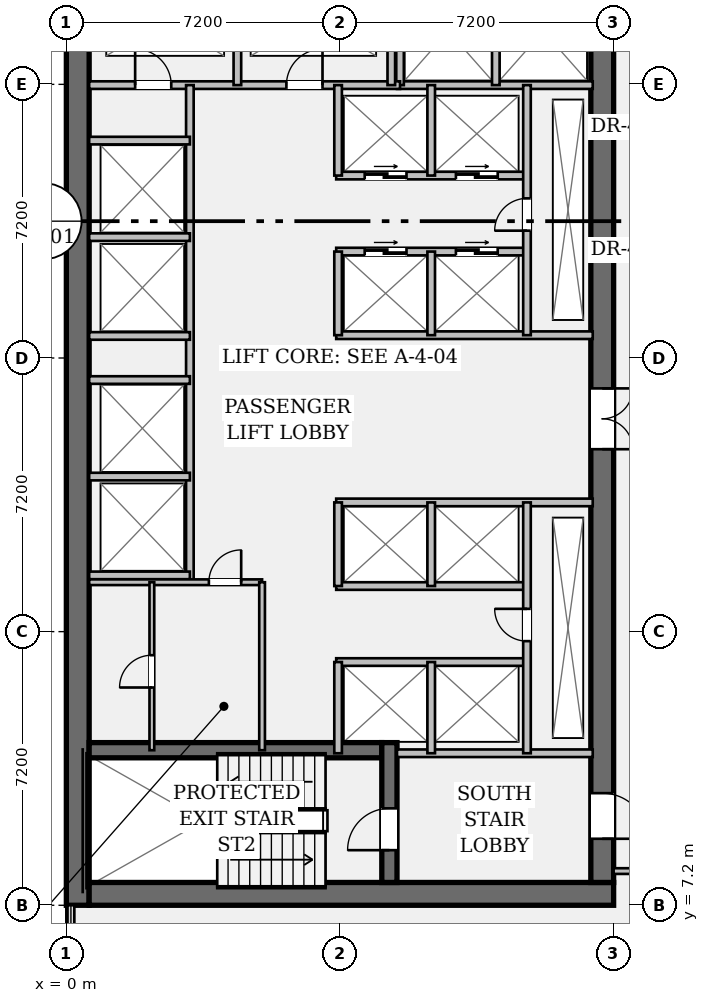
"""IFC4 building model, lengths in metres.
Left out: names, types, materials, properties, quantities, classifications, styles, units other than length and angle.
Written with IfcOpenShell. Run it as: python <this file> out.ifc"""

import sys

from ifc_helpers import new_model, si_unit, direction, frame, frame_2d, origin, place, context, subcontext, project, spatial, rectangle, extrude, element, fill, save


model = new_model("IFC4")
c1 = context("Model", 3, precision=1e-05, world=origin(), true_north=direction((0.0, 1.0)))
c2 = subcontext(c1, "Body", "Model", "MODEL_VIEW")
j1 = project(units=[si_unit("LENGTHUNIT", "METRE"), si_unit("PLANEANGLEUNIT", "RADIAN")], contexts=[c1])
p1 = place(None, origin())
s1 = spatial("IfcSite", under=j1, at=p1, CompositionType="ELEMENT")
p2 = place(p1, origin())
s2 = spatial("IfcBuilding", under=s1, at=p2, CompositionType="ELEMENT")
p3 = place(p2, frame((0.0, 0.0, 38.85)))
s3 = spatial("IfcBuildingStorey", under=s2, at=p3, CompositionType="ELEMENT", Elevation=38.85)
p4 = place(p3, frame((0.3, 7.2, 0.0), z_axis=(0.0, 0.0, 1.0), x_axis=(0.0, 1.0, 0.0)))
e1 = element("IfcWall", 1, at=p4, inside=s3, PredefinedType="SHEAR", context=c2, shape_type="SweptSolid", body=[
    extrude(rectangle(XDim=28.8, YDim=0.6, at=frame_2d((14.4, 0.0))), origin(), (0.0, 0.0, 1.0), 3.57),
])
p5 = place(p3, frame((0.6, 7.5, 0.0), z_axis=(0.0, 0.0, 1.0), x_axis=(1.0, 0.0, 0.0)))
e2 = element("IfcWall", 2, at=p5, inside=s3, PredefinedType="SHEAR", context=c2, shape_type="SweptSolid", body=[
    extrude(rectangle(XDim=13.8, YDim=0.6, at=frame_2d((6.9, 0.0))), origin(), (0.0, 0.0, 1.0), 3.57),
])
p6 = place(p3, frame((14.1, 35.4, 0.0), z_axis=(0.0, 0.0, 1.0), x_axis=(0.0, -1.0, 0.0)))
e3 = element("IfcWall", 3, at=p6, inside=s3, PredefinedType="SHEAR", context=c2, shape_type="SweptSolid", body=[
    extrude(rectangle(XDim=27.6, YDim=0.6, at=frame_2d((13.8, 0.0))), origin(), (0.0, 0.0, 1.0), 3.57),
])
p7 = place(p6, frame((1.3, 0.0, 0.0)))
e4 = element("IfcOpeningElement", 4, at=p7, cuts=e3, PredefinedType="OPENING", context=c2, shape_type="SweptSolid", body=[
    extrude(rectangle(XDim=1.2, YDim=2.15, at=frame_2d((0.6, 1.075))), frame((0.0, 0.312, 0.0), z_axis=(0.0, -1.0, 0.0), x_axis=(1.0, 0.0, 0.0)), (0.0, 0.0, 1.0), 0.624),
])
p8 = place(p6, frame((25.25, 0.0, 0.0)))
e5 = element("IfcOpeningElement", 5, at=p8, cuts=e3, PredefinedType="OPENING", context=c2, shape_type="SweptSolid", body=[
    extrude(rectangle(XDim=1.2, YDim=2.15, at=frame_2d((0.6, 1.075))), frame((0.0, 0.312, 0.0), z_axis=(0.0, -1.0, 0.0), x_axis=(1.0, 0.0, 0.0)), (0.0, 0.0, 1.0), 0.624),
])
p9 = place(p6, frame((14.6, 0.0, 0.0)))
e6 = element("IfcOpeningElement", 6, at=p9, cuts=e3, PredefinedType="OPENING", context=c2, shape_type="SweptSolid", body=[
    extrude(rectangle(XDim=1.6, YDim=2.2, at=frame_2d((0.8, 1.1))), frame((0.0, 0.312, 0.0), z_axis=(0.0, -1.0, 0.0), x_axis=(1.0, 0.0, 0.0)), (0.0, 0.0, 1.0), 0.624),
])
p10 = place(p3, frame((0.6, 11.28, 0.0), z_axis=(0.0, 0.0, 1.0), x_axis=(1.0, 0.0, 0.0)))
e7 = element("IfcWall", 7, at=p10, inside=s3, PredefinedType="SHEAR", context=c2, shape_type="SweptSolid", body=[
    extrude(rectangle(XDim=7.7, YDim=0.4, at=frame_2d((3.85, 0.0))), origin(), (0.0, 0.0, 1.0), 3.57),
])
p11 = place(p3, frame((8.5, 7.8, 0.0), z_axis=(0.0, 0.0, 1.0), x_axis=(0.0, 1.0, 0.0)))
e8 = element("IfcWall", 8, at=p11, inside=s3, PredefinedType="SHEAR", context=c2, shape_type="SweptSolid", body=[
    extrude(rectangle(XDim=3.68, YDim=0.4, at=frame_2d((1.84, 0.0))), origin(), (0.0, 0.0, 1.0), 3.57),
])
p12 = place(p11, frame((0.85, 0.0, 0.0)))
e9 = element("IfcOpeningElement", 9, at=p12, cuts=e8, PredefinedType="OPENING", context=c2, shape_type="SweptSolid", body=[
    extrude(rectangle(XDim=1.1, YDim=2.15, at=frame_2d((0.55, 1.075))), frame((0.0, 0.212, 0.0), z_axis=(0.0, -1.0, 0.0), x_axis=(1.0, 0.0, 0.0)), (0.0, 0.0, 1.0), 0.424),
])
for number, where, z_axis, x_axis in (
    (10, (8.7, 11.2, 0.0), (0.0, 0.0, 1.0), (1.0, 0.0, 0.0)),
    (11, (8.7, 28.78, 0.0), (0.0, 0.0, 1.0), (1.0, 0.0, 0.0)),
):
    element("IfcWall", number, at=place(p3, frame(where, z_axis=z_axis, x_axis=x_axis)), inside=s3, PredefinedType="PARTITIONING", context=c2, shape_type="SweptSolid", body=[
        extrude(rectangle(XDim=5.15, YDim=0.2, at=frame_2d((2.575, 0.0))), origin(), (0.0, 0.0, 1.0), 3.57),
    ])
for number, where, z_axis, x_axis in (
    (12, (8.78, 28.78, 0.0), (0.0, 0.0, 1.0), (0.0, 1.0, 0.0)),
    (13, (11.3, 28.78, 0.0), (0.0, 0.0, 1.0), (0.0, 1.0, 0.0)),
):
    element("IfcWall", number, at=place(p3, frame(where, z_axis=z_axis, x_axis=x_axis)), inside=s3, PredefinedType="PARTITIONING", context=c2, shape_type="SweptSolid", body=[
        extrude(rectangle(XDim=3.1, YDim=0.2, at=frame_2d((1.55, 0.0))), origin(), (0.0, 0.0, 1.0), 3.57),
    ])
p13 = place(p3, frame((0.6, 28.78, 0.0), z_axis=(0.0, 0.0, 1.0), x_axis=(1.0, 0.0, 0.0)))
e14 = element("IfcWall", 14, at=p13, inside=s3, PredefinedType="PARTITIONING", context=c2, shape_type="SweptSolid", body=[
    extrude(rectangle(XDim=8.18, YDim=0.2, at=frame_2d((4.09, 0.0))), origin(), (0.0, 0.0, 1.0), 3.57),
])
p14 = place(p13, frame((1.21, 0.0, 0.0)))
e15 = element("IfcOpeningElement", 15, at=p14, cuts=e14, PredefinedType="OPENING", context=c2, shape_type="SweptSolid", body=[
    extrude(rectangle(XDim=0.95, YDim=2.15, at=frame_2d((0.475, 1.075))), frame((0.0, 0.112, 0.0), z_axis=(0.0, -1.0, 0.0), x_axis=(1.0, 0.0, 0.0)), (0.0, 0.0, 1.0), 0.224),
])
p15 = place(p13, frame((5.19, 0.0, 0.0)))
e16 = element("IfcOpeningElement", 16, at=p15, cuts=e14, PredefinedType="OPENING", context=c2, shape_type="SweptSolid", body=[
    extrude(rectangle(XDim=0.95, YDim=2.15, at=frame_2d((0.475, 1.075))), frame((0.0, 0.112, 0.0), z_axis=(0.0, -1.0, 0.0), x_axis=(1.0, 0.0, 0.0)), (0.0, 0.0, 1.0), 0.224),
])
for number, where, z_axis, x_axis in (
    (17, (4.5, 28.78, 0.0), (0.0, 0.0, 1.0), (0.0, 1.0, 0.0)),
    (18, (8.55, 28.78, 0.0), (0.0, 0.0, 1.0), (0.0, 1.0, 0.0)),
):
    element("IfcWall", number, at=place(p3, frame(where, z_axis=z_axis, x_axis=x_axis)), inside=s3, PredefinedType="PARTITIONING", context=c2, shape_type="SweptSolid", body=[
        extrude(rectangle(XDim=2.94, YDim=0.2, at=frame_2d((1.47, 0.0))), origin(), (0.0, 0.0, 1.0), 3.57),
    ])
p16 = place(p3, frame((3.25, 15.7, 0.0), z_axis=(0.0, 0.0, 1.0), x_axis=(0.0, 1.0, 0.0)))
e19 = element("IfcWall", 19, at=p16, inside=s3, PredefinedType="PARTITIONING", context=c2, shape_type="SweptSolid", body=[
    extrude(rectangle(XDim=13.08, YDim=0.2, at=frame_2d((6.54, 0.0))), origin(), (0.0, 0.0, 1.0), 3.57),
])
for number, where, z_axis, x_axis in (
    (20, (0.6, 15.88, 0.0), (0.0, 0.0, 1.0), (1.0, 0.0, 0.0)),
    (21, (0.6, 18.48, 0.0), (0.0, 0.0, 1.0), (1.0, 0.0, 0.0)),
    (22, (0.6, 22.18, 0.0), (0.0, 0.0, 1.0), (1.0, 0.0, 0.0)),
    (23, (0.6, 24.78, 0.0), (0.0, 0.0, 1.0), (1.0, 0.0, 0.0)),
    (24, (0.6, 21.02, 0.0), (0.0, 0.0, 1.0), (1.0, 0.0, 0.0)),
    (25, (0.6, 27.32, 0.0), (0.0, 0.0, 1.0), (1.0, 0.0, 0.0)),
):
    element("IfcWall", number, at=place(p3, frame(where, z_axis=z_axis, x_axis=x_axis)), inside=s3, PredefinedType="PARTITIONING", context=c2, shape_type="SweptSolid", body=[
        extrude(rectangle(XDim=2.65, YDim=0.2, at=frame_2d((1.325, 0.0))), origin(), (0.0, 0.0, 1.0), 3.57),
    ])
p17 = place(p3, frame((7.1, 22.2, 0.0), z_axis=(0.0, 0.0, 1.0), x_axis=(1.0, 0.0, 0.0)))
e26 = element("IfcWall", 26, at=p17, inside=s3, PredefinedType="PARTITIONING", context=c2, shape_type="SweptSolid", body=[
    extrude(rectangle(XDim=6.75, YDim=0.2, at=frame_2d((3.375, 0.0))), origin(), (0.0, 0.0, 1.0), 3.57),
])
p18 = place(p3, frame((7.1, 24.4, 0.0), z_axis=(0.0, 0.0, 1.0), x_axis=(1.0, 0.0, 0.0)))
e27 = element("IfcWall", 27, at=p18, inside=s3, PredefinedType="PARTITIONING", context=c2, shape_type="SweptSolid", body=[
    extrude(rectangle(XDim=5.02, YDim=0.2, at=frame_2d((2.51, 0.0))), origin(), (0.0, 0.0, 1.0), 3.57),
])
p19 = place(p18, frame((0.75, 0.0, 0.0)))
e28 = element("IfcOpeningElement", 28, at=p19, cuts=e27, PredefinedType="OPENING", context=c2, shape_type="SweptSolid", body=[
    extrude(rectangle(XDim=1.1, YDim=2.2, at=frame_2d((0.55, 1.1))), frame((0.0, 0.112, 0.0), z_axis=(0.0, -1.0, 0.0), x_axis=(1.0, 0.0, 0.0)), (0.0, 0.0, 1.0), 0.224),
])
p20 = place(p18, frame((3.15, 0.0, 0.0)))
e29 = element("IfcOpeningElement", 29, at=p20, cuts=e27, PredefinedType="OPENING", context=c2, shape_type="SweptSolid", body=[
    extrude(rectangle(XDim=1.1, YDim=2.2, at=frame_2d((0.55, 1.1))), frame((0.0, 0.112, 0.0), z_axis=(0.0, -1.0, 0.0), x_axis=(1.0, 0.0, 0.0)), (0.0, 0.0, 1.0), 0.224),
])
p21 = place(p3, frame((7.1, 26.4, 0.0), z_axis=(0.0, 0.0, 1.0), x_axis=(1.0, 0.0, 0.0)))
e30 = element("IfcWall", 30, at=p21, inside=s3, PredefinedType="PARTITIONING", context=c2, shape_type="SweptSolid", body=[
    extrude(rectangle(XDim=5.02, YDim=0.2, at=frame_2d((2.51, 0.0))), origin(), (0.0, 0.0, 1.0), 3.57),
])
p22 = place(p21, frame((0.75, 0.0, 0.0)))
e31 = element("IfcOpeningElement", 31, at=p22, cuts=e30, PredefinedType="OPENING", context=c2, shape_type="SweptSolid", body=[
    extrude(rectangle(XDim=1.1, YDim=2.2, at=frame_2d((0.55, 1.1))), frame((0.0, 0.112, 0.0), z_axis=(0.0, -1.0, 0.0), x_axis=(1.0, 0.0, 0.0)), (0.0, 0.0, 1.0), 0.224),
])
p23 = place(p21, frame((3.15, 0.0, 0.0)))
e32 = element("IfcOpeningElement", 32, at=p23, cuts=e30, PredefinedType="OPENING", context=c2, shape_type="SweptSolid", body=[
    extrude(rectangle(XDim=1.1, YDim=2.2, at=frame_2d((0.55, 1.1))), frame((0.0, 0.112, 0.0), z_axis=(0.0, -1.0, 0.0), x_axis=(1.0, 0.0, 0.0)), (0.0, 0.0, 1.0), 0.224),
])
p24 = place(p3, frame((7.15, 22.2, 0.0), z_axis=(0.0, 0.0, 1.0), x_axis=(0.0, 1.0, 0.0)))
e33 = element("IfcWall", 33, at=p24, inside=s3, PredefinedType="PARTITIONING", context=c2, shape_type="SweptSolid", body=[
    extrude(rectangle(XDim=2.2, YDim=0.2, at=frame_2d((1.1, 0.0))), origin(), (0.0, 0.0, 1.0), 3.57),
])
p25 = place(p3, frame((7.15, 26.4, 0.0), z_axis=(0.0, 0.0, 1.0), x_axis=(0.0, 1.0, 0.0)))
e34 = element("IfcWall", 34, at=p25, inside=s3, PredefinedType="PARTITIONING", context=c2, shape_type="SweptSolid", body=[
    extrude(rectangle(XDim=2.38, YDim=0.2, at=frame_2d((1.19, 0.0))), origin(), (0.0, 0.0, 1.0), 3.57),
])
p26 = place(p3, frame((9.6, 22.2, 0.0), z_axis=(0.0, 0.0, 1.0), x_axis=(0.0, 1.0, 0.0)))
e35 = element("IfcWall", 35, at=p26, inside=s3, PredefinedType="PARTITIONING", context=c2, shape_type="SweptSolid", body=[
    extrude(rectangle(XDim=2.2, YDim=0.2, at=frame_2d((1.1, 0.0))), origin(), (0.0, 0.0, 1.0), 3.57),
])
p27 = place(p3, frame((9.6, 26.4, 0.0), z_axis=(0.0, 0.0, 1.0), x_axis=(0.0, 1.0, 0.0)))
e36 = element("IfcWall", 36, at=p27, inside=s3, PredefinedType="PARTITIONING", context=c2, shape_type="SweptSolid", body=[
    extrude(rectangle(XDim=2.38, YDim=0.2, at=frame_2d((1.19, 0.0))), origin(), (0.0, 0.0, 1.0), 3.57),
])
p28 = place(p3, frame((12.12, 22.2, 0.0), z_axis=(0.0, 0.0, 1.0), x_axis=(0.0, 1.0, 0.0)))
e37 = element("IfcWall", 37, at=p28, inside=s3, PredefinedType="PARTITIONING", context=c2, shape_type="SweptSolid", body=[
    extrude(rectangle(XDim=6.58, YDim=0.2, at=frame_2d((3.29, 0.0))), origin(), (0.0, 0.0, 1.0), 3.57),
])
p29 = place(p28, frame((2.75, 0.0, 0.0)))
e38 = element("IfcOpeningElement", 38, at=p29, cuts=e37, PredefinedType="OPENING", context=c2, shape_type="SweptSolid", body=[
    extrude(rectangle(XDim=0.85, YDim=2.15, at=frame_2d((0.425, 1.075))), frame((0.0, 0.112, 0.0), z_axis=(0.0, -1.0, 0.0), x_axis=(1.0, 0.0, 0.0)), (0.0, 0.0, 1.0), 0.224),
])
p30 = place(p3, frame((7.1, 17.8, 0.0), z_axis=(0.0, 0.0, 1.0), x_axis=(1.0, 0.0, 0.0)))
e39 = element("IfcWall", 39, at=p30, inside=s3, PredefinedType="PARTITIONING", context=c2, shape_type="SweptSolid", body=[
    extrude(rectangle(XDim=6.75, YDim=0.2, at=frame_2d((3.375, 0.0))), origin(), (0.0, 0.0, 1.0), 3.57),
])
for number, where, z_axis, x_axis in (
    (40, (7.1, 15.6, 0.0), (0.0, 0.0, 1.0), (1.0, 0.0, 0.0)),
    (41, (7.1, 13.6, 0.0), (0.0, 0.0, 1.0), (1.0, 0.0, 0.0)),
):
    element("IfcWall", number, at=place(p3, frame(where, z_axis=z_axis, x_axis=x_axis)), inside=s3, PredefinedType="PARTITIONING", context=c2, shape_type="SweptSolid", body=[
        extrude(rectangle(XDim=5.02, YDim=0.2, at=frame_2d((2.51, 0.0))), origin(), (0.0, 0.0, 1.0), 3.57),
    ])
p31 = place(p3, frame((7.15, 15.6, 0.0), z_axis=(0.0, 0.0, 1.0), x_axis=(0.0, 1.0, 0.0)))
e42 = element("IfcWall", 42, at=p31, inside=s3, PredefinedType="PARTITIONING", context=c2, shape_type="SweptSolid", body=[
    extrude(rectangle(XDim=2.2, YDim=0.2, at=frame_2d((1.1, 0.0))), origin(), (0.0, 0.0, 1.0), 3.57),
])
p32 = place(p3, frame((7.15, 11.2, 0.0), z_axis=(0.0, 0.0, 1.0), x_axis=(0.0, 1.0, 0.0)))
e43 = element("IfcWall", 43, at=p32, inside=s3, PredefinedType="PARTITIONING", context=c2, shape_type="SweptSolid", body=[
    extrude(rectangle(XDim=2.4, YDim=0.2, at=frame_2d((1.2, 0.0))), origin(), (0.0, 0.0, 1.0), 3.57),
])
p33 = place(p3, frame((9.6, 15.6, 0.0), z_axis=(0.0, 0.0, 1.0), x_axis=(0.0, 1.0, 0.0)))
e44 = element("IfcWall", 44, at=p33, inside=s3, PredefinedType="PARTITIONING", context=c2, shape_type="SweptSolid", body=[
    extrude(rectangle(XDim=2.2, YDim=0.2, at=frame_2d((1.1, 0.0))), origin(), (0.0, 0.0, 1.0), 3.57),
])
p34 = place(p3, frame((9.6, 11.2, 0.0), z_axis=(0.0, 0.0, 1.0), x_axis=(0.0, 1.0, 0.0)))
e45 = element("IfcWall", 45, at=p34, inside=s3, PredefinedType="PARTITIONING", context=c2, shape_type="SweptSolid", body=[
    extrude(rectangle(XDim=2.4, YDim=0.2, at=frame_2d((1.2, 0.0))), origin(), (0.0, 0.0, 1.0), 3.57),
])
p35 = place(p3, frame((12.12, 11.2, 0.0), z_axis=(0.0, 0.0, 1.0), x_axis=(0.0, 1.0, 0.0)))
e46 = element("IfcWall", 46, at=p35, inside=s3, PredefinedType="PARTITIONING", context=c2, shape_type="SweptSolid", body=[
    extrude(rectangle(XDim=6.6, YDim=0.2, at=frame_2d((3.3, 0.0))), origin(), (0.0, 0.0, 1.0), 3.57),
])
p36 = place(p35, frame((2.95, 0.0, 0.0)))
e47 = element("IfcOpeningElement", 47, at=p36, cuts=e46, PredefinedType="OPENING", context=c2, shape_type="SweptSolid", body=[
    extrude(rectangle(XDim=0.85, YDim=2.15, at=frame_2d((0.425, 1.075))), frame((0.0, 0.112, 0.0), z_axis=(0.0, -1.0, 0.0), x_axis=(1.0, 0.0, 0.0)), (0.0, 0.0, 1.0), 0.224),
])
p37 = place(p3, frame((0.6, 15.7, 0.0), z_axis=(0.0, 0.0, 1.0), x_axis=(1.0, 0.0, 0.0)))
e48 = element("IfcWall", 48, at=p37, inside=s3, PredefinedType="PARTITIONING", context=c2, shape_type="SweptSolid", body=[
    extrude(rectangle(XDim=4.55, YDim=0.15, at=frame_2d((2.275, 0.0))), origin(), (0.0, 0.0, 1.0), 3.57),
])
p38 = place(p37, frame((3.15, 0.0, 0.0)))
e49 = element("IfcOpeningElement", 49, at=p38, cuts=e48, PredefinedType="OPENING", context=c2, shape_type="SweptSolid", body=[
    extrude(rectangle(XDim=0.85, YDim=2.15, at=frame_2d((0.425, 1.075))), frame((0.0, 0.087, 0.0), z_axis=(0.0, -1.0, 0.0), x_axis=(1.0, 0.0, 0.0)), (0.0, 0.0, 1.0), 0.174),
])
p39 = place(p3, frame((5.15, 11.28, 0.0), z_axis=(0.0, 0.0, 1.0), x_axis=(0.0, 1.0, 0.0)))
e50 = element("IfcWall", 50, at=p39, inside=s3, PredefinedType="PARTITIONING", context=c2, shape_type="SweptSolid", body=[
    extrude(rectangle(XDim=4.42, YDim=0.15, at=frame_2d((2.21, 0.0))), origin(), (0.0, 0.0, 1.0), 3.57),
])
p40 = place(p3, frame((2.25, 11.28, 0.0), z_axis=(0.0, 0.0, 1.0), x_axis=(0.0, 1.0, 0.0)))
e51 = element("IfcWall", 51, at=p40, inside=s3, PredefinedType="PARTITIONING", context=c2, shape_type="SweptSolid", body=[
    extrude(rectangle(XDim=4.42, YDim=0.125, at=frame_2d((2.21, 0.0))), origin(), (0.0, 0.0, 1.0), 3.57),
])
p41 = place(p40, frame((1.65, 0.0, 0.0)))
e52 = element("IfcOpeningElement", 52, at=p41, cuts=e51, PredefinedType="OPENING", context=c2, shape_type="SweptSolid", body=[
    extrude(rectangle(XDim=0.85, YDim=2.15, at=frame_2d((0.425, 1.075))), frame((0.0, 0.074, 0.0), z_axis=(0.0, -1.0, 0.0), x_axis=(1.0, 0.0, 0.0)), (0.0, 0.0, 1.0), 0.149),
])
p42 = place(p3, frame((14.4, 8.1, 0.0), z_axis=(0.0, 0.0, 1.0), x_axis=(1.0, 0.0, 0.0)))
e53 = element("IfcWall", 53, at=p42, inside=s3, PredefinedType="PARTITIONING", context=c2, shape_type="SweptSolid", body=[
    extrude(rectangle(XDim=2.95, YDim=0.15, at=frame_2d((1.475, 0.0))), origin(), (0.0, 0.0, 1.0), 2.628),
])
p43 = place(p42, frame((0.95, 0.0, 0.0)))
e54 = element("IfcOpeningElement", 54, at=p43, cuts=e53, PredefinedType="OPENING", context=c2, shape_type="SweptSolid", body=[
    extrude(rectangle(XDim=0.95, YDim=2.15, at=frame_2d((0.475, 1.075))), frame((0.0, 0.087, 0.0), z_axis=(0.0, -1.0, 0.0), x_axis=(1.0, 0.0, 0.0)), (0.0, 0.0, 1.0), 0.174),
])
p44 = place(p12, origin())
e55 = element("IfcDoor", 55, at=p44, inside=s3, OperationType="SINGLE_SWING_LEFT", PredefinedType="DOOR", context=c2, shape_type="SweptSolid", body=[
    extrude(rectangle(XDim=1.1, YDim=2.15, at=frame_2d((0.55, 1.075))), frame((0.0, 0.025, 0.0), z_axis=(0.0, -1.0, 0.0), x_axis=(1.0, 0.0, 0.0)), (0.0, 0.0, 1.0), 0.05),
])
fill(e9, e55)
p45 = place(p8, origin())
e56 = element("IfcDoor", 56, at=p45, inside=s3, OperationType="SINGLE_SWING_RIGHT", PredefinedType="DOOR", context=c2, shape_type="SweptSolid", body=[
    extrude(rectangle(XDim=1.2, YDim=2.15, at=frame_2d((0.6, 1.075))), frame((0.0, 0.025, 0.0), z_axis=(0.0, -1.0, 0.0), x_axis=(1.0, 0.0, 0.0)), (0.0, 0.0, 1.0), 0.05),
])
fill(e5, e56)
p46 = place(p14, origin())
e57 = element("IfcDoor", 57, at=p46, inside=s3, OperationType="SINGLE_SWING_LEFT", PredefinedType="DOOR", context=c2, shape_type="SweptSolid", body=[
    extrude(rectangle(XDim=0.95, YDim=2.15, at=frame_2d((0.475, 1.075))), frame((0.0, 0.025, 0.0), z_axis=(0.0, -1.0, 0.0), x_axis=(1.0, 0.0, 0.0)), (0.0, 0.0, 1.0), 0.05),
])
fill(e15, e57)
p47 = place(p15, origin())
e58 = element("IfcDoor", 58, at=p47, inside=s3, OperationType="SINGLE_SWING_RIGHT", PredefinedType="DOOR", context=c2, shape_type="SweptSolid", body=[
    extrude(rectangle(XDim=0.95, YDim=2.15, at=frame_2d((0.475, 1.075))), frame((0.0, 0.025, 0.0), z_axis=(0.0, -1.0, 0.0), x_axis=(1.0, 0.0, 0.0)), (0.0, 0.0, 1.0), 0.05),
])
fill(e16, e58)
p48 = place(p9, origin())
e59 = element("IfcDoor", 59, at=p48, inside=s3, OperationType="DOUBLE_DOOR_SINGLE_SWING", PredefinedType="DOOR", context=c2, shape_type="SweptSolid", body=[
    extrude(rectangle(XDim=1.6, YDim=2.2, at=frame_2d((0.8, 1.1))), frame((0.0, 0.025, 0.0), z_axis=(0.0, -1.0, 0.0), x_axis=(1.0, 0.0, 0.0)), (0.0, 0.0, 1.0), 0.05),
])
fill(e6, e59)
p49 = place(p29, origin())
e60 = element("IfcDoor", 60, at=p49, inside=s3, OperationType="SINGLE_SWING_LEFT", PredefinedType="DOOR", context=c2, shape_type="SweptSolid", body=[
    extrude(rectangle(XDim=0.85, YDim=2.15, at=frame_2d((0.425, 1.075))), frame((0.0, 0.025, 0.0), z_axis=(0.0, -1.0, 0.0), x_axis=(1.0, 0.0, 0.0)), (0.0, 0.0, 1.0), 0.05),
])
fill(e38, e60)
p50 = place(p19, origin())
e61 = element("IfcDoor", 61, at=p50, inside=s3, OperationType="DOUBLE_DOOR_SLIDING", PredefinedType="DOOR", context=c2, shape_type="SweptSolid", body=[
    extrude(rectangle(XDim=1.1, YDim=2.2, at=frame_2d((0.55, 1.1))), frame((0.0, 0.025, 0.0), z_axis=(0.0, -1.0, 0.0), x_axis=(1.0, 0.0, 0.0)), (0.0, 0.0, 1.0), 0.05),
])
fill(e28, e61)
p51 = place(p20, origin())
e62 = element("IfcDoor", 62, at=p51, inside=s3, OperationType="DOUBLE_DOOR_SLIDING", PredefinedType="DOOR", context=c2, shape_type="SweptSolid", body=[
    extrude(rectangle(XDim=1.1, YDim=2.2, at=frame_2d((0.55, 1.1))), frame((0.0, 0.025, 0.0), z_axis=(0.0, -1.0, 0.0), x_axis=(1.0, 0.0, 0.0)), (0.0, 0.0, 1.0), 0.05),
])
fill(e29, e62)
p52 = place(p22, origin())
e63 = element("IfcDoor", 63, at=p52, inside=s3, OperationType="DOUBLE_DOOR_SLIDING", PredefinedType="DOOR", context=c2, shape_type="SweptSolid", body=[
    extrude(rectangle(XDim=1.1, YDim=2.2, at=frame_2d((0.55, 1.1))), frame((0.0, 0.025, 0.0), z_axis=(0.0, -1.0, 0.0), x_axis=(1.0, 0.0, 0.0)), (0.0, 0.0, 1.0), 0.05),
])
fill(e31, e63)
p53 = place(p23, origin())
e64 = element("IfcDoor", 64, at=p53, inside=s3, OperationType="DOUBLE_DOOR_SLIDING", PredefinedType="DOOR", context=c2, shape_type="SweptSolid", body=[
    extrude(rectangle(XDim=1.1, YDim=2.2, at=frame_2d((0.55, 1.1))), frame((0.0, 0.025, 0.0), z_axis=(0.0, -1.0, 0.0), x_axis=(1.0, 0.0, 0.0)), (0.0, 0.0, 1.0), 0.05),
])
fill(e32, e64)
p54 = place(p36, origin())
e65 = element("IfcDoor", 65, at=p54, inside=s3, OperationType="SINGLE_SWING_RIGHT", PredefinedType="DOOR", context=c2, shape_type="SweptSolid", body=[
    extrude(rectangle(XDim=0.85, YDim=2.15, at=frame_2d((0.425, 1.075))), frame((0.0, 0.025, 0.0), z_axis=(0.0, -1.0, 0.0), x_axis=(1.0, 0.0, 0.0)), (0.0, 0.0, 1.0), 0.05),
])
fill(e47, e65)
p55 = place(p38, origin())
e66 = element("IfcDoor", 66, at=p55, inside=s3, OperationType="SINGLE_SWING_RIGHT", PredefinedType="DOOR", context=c2, shape_type="SweptSolid", body=[
    extrude(rectangle(XDim=0.85, YDim=2.15, at=frame_2d((0.425, 1.075))), frame((0.0, 0.025, 0.0), z_axis=(0.0, -1.0, 0.0), x_axis=(1.0, 0.0, 0.0)), (0.0, 0.0, 1.0), 0.05),
])
fill(e49, e66)
p56 = place(p41, origin())
e67 = element("IfcDoor", 67, at=p56, inside=s3, OperationType="SINGLE_SWING_LEFT", PredefinedType="DOOR", context=c2, shape_type="SweptSolid", body=[
    extrude(rectangle(XDim=0.85, YDim=2.15, at=frame_2d((0.425, 1.075))), frame((0.0, 0.025, 0.0), z_axis=(0.0, -1.0, 0.0), x_axis=(1.0, 0.0, 0.0)), (0.0, 0.0, 1.0), 0.05),
])
fill(e52, e67)
save(model, sys.argv[1])
